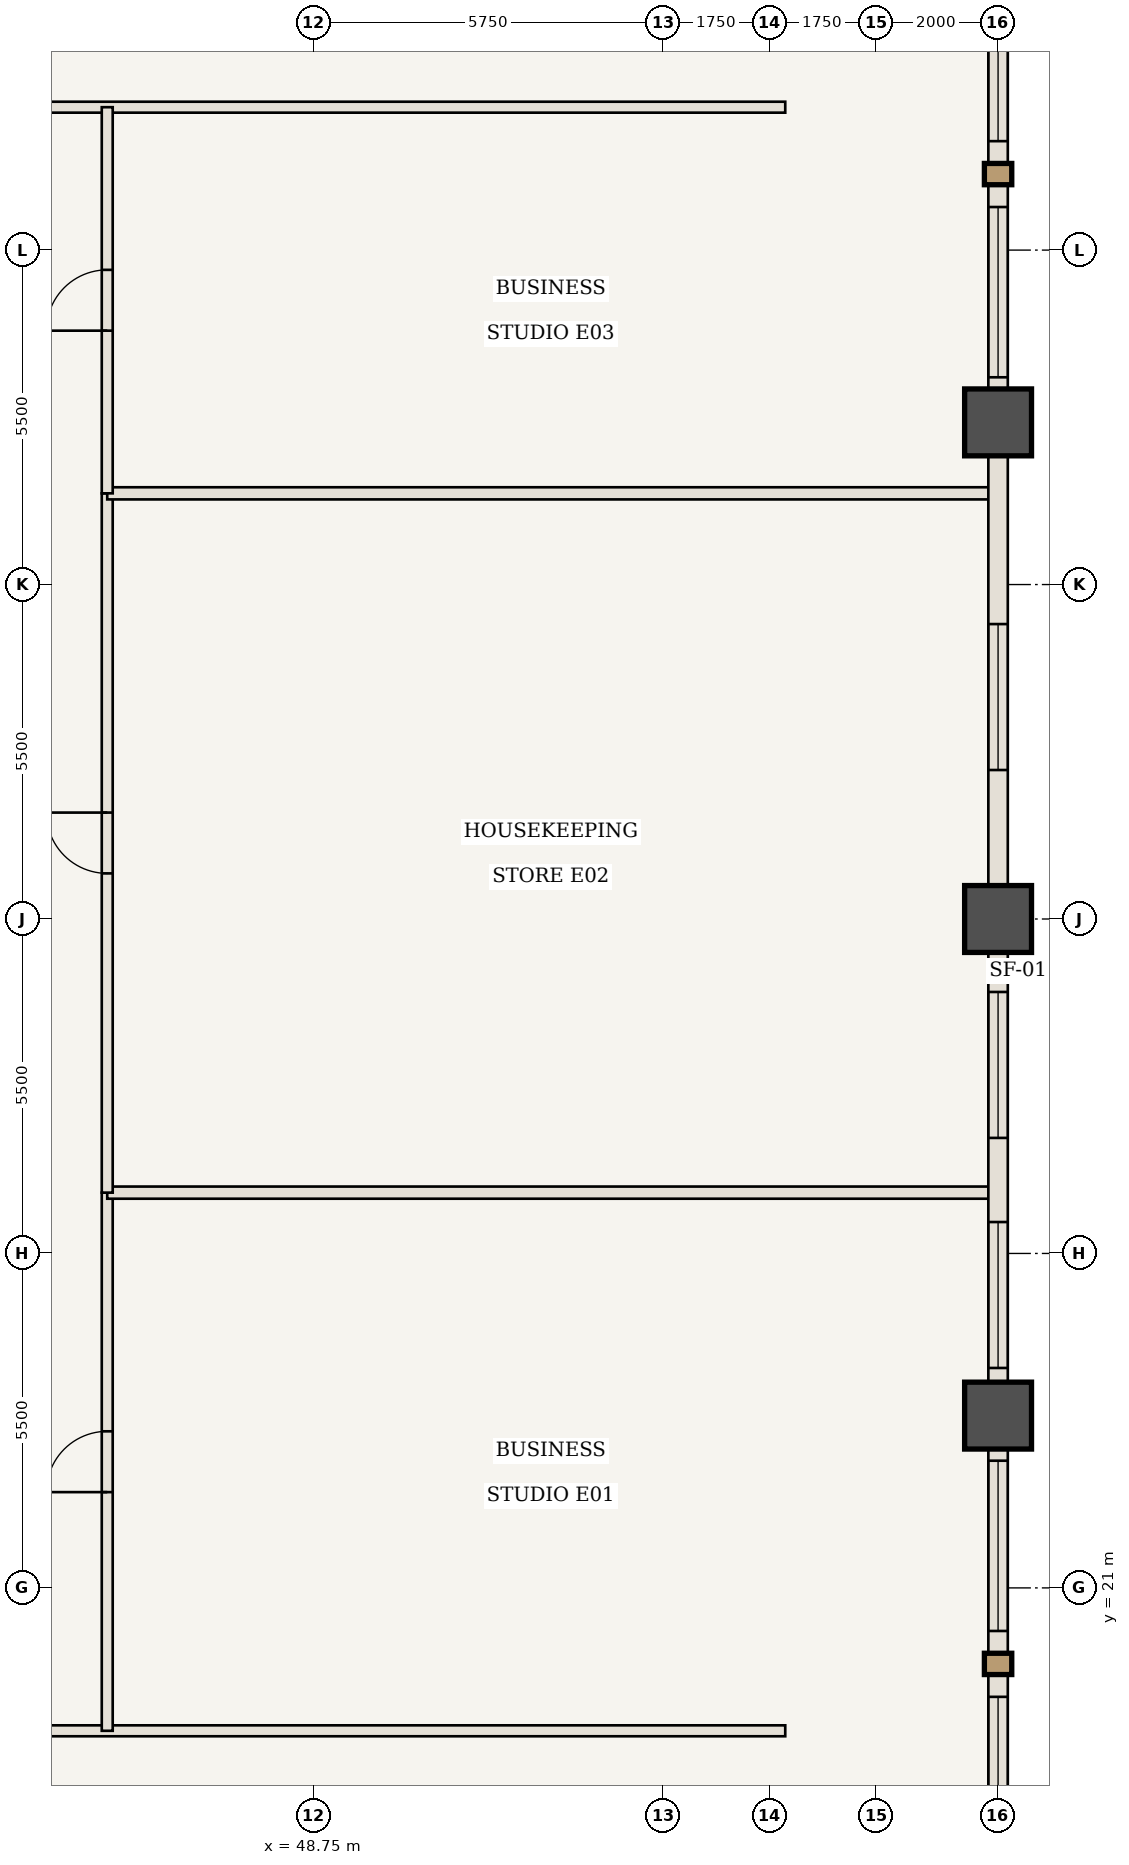
"""IFC4 building model, lengths in metres.
Left out: names, types, materials, properties, quantities, classifications, styles, units other than length and angle.
Written with IfcOpenShell. Run it as: python <this file> out.ifc"""

import sys

from ifc_helpers import new_model, si_unit, direction, frame, frame_2d, origin, origin_2d, place, context, subcontext, project, spatial, rectangle, extrude, element, fill, save


model = new_model("IFC4")
c1 = context("Model", 3, precision=1e-05, world=origin(), true_north=direction((0.0, 1.0)))
c2 = subcontext(c1, "Body", "Model", "MODEL_VIEW")
j1 = project(units=[si_unit("LENGTHUNIT", "METRE"), si_unit("PLANEANGLEUNIT", "RADIAN")], contexts=[c1])
p1 = place(None, origin())
s1 = spatial("IfcSite", under=j1, at=p1, CompositionType="ELEMENT")
p2 = place(p1, origin())
s2 = spatial("IfcBuilding", under=s1, at=p2, CompositionType="ELEMENT")
p3 = place(p2, frame((0.0, 0.0, 63.35)))
s3 = spatial("IfcBuildingStorey", under=s2, at=p3, CompositionType="ELEMENT", Elevation=63.35)
for number, where, z_axis, x_axis in (
    (1, (60.0, 23.833, 0.0), (0.0, 0.0, 1.0), (1.0, 0.0, 0.0)),
    (2, (60.0, 32.0, 0.0), (0.0, 0.0, 1.0), (1.0, 0.0, 0.0)),
    (3, (60.0, 40.167, 0.0), (0.0, 0.0, 1.0), (1.0, 0.0, 0.0)),
):
    element("IfcColumn", number, at=place(p3, frame(where, z_axis=z_axis, x_axis=x_axis)), inside=s3, PredefinedType="COLUMN", context=c2, shape_type="SweptSolid", body=[
        extrude(rectangle(XDim=1.1, YDim=1.1, at=origin_2d()), origin(), (0.0, 0.0, 1.0), 3.5),
    ])
p4 = place(p3, frame((33.4, 18.65, 0.0), z_axis=(0.0, 0.0, 1.0), x_axis=(1.0, 0.0, 0.0)))
e4 = element("IfcWall", 4, at=p4, inside=s3, PredefinedType="STANDARD", context=c2, shape_type="SweptSolid", body=[
    extrude(rectangle(XDim=23.1, YDim=0.18, at=frame_2d((11.55, 0.0))), origin(), (0.0, 0.0, 1.0), 3.32),
])
p5 = place(p4, frame((5.45, 0.0, 0.0)))
e5 = element("IfcOpeningElement", 5, at=p5, cuts=e4, PredefinedType="OPENING", context=c2, shape_type="SweptSolid", body=[
    extrude(rectangle(XDim=1.0, YDim=2.15, at=frame_2d((0.5, 1.075))), frame((0.0, 0.1, 0.0), z_axis=(0.0, -1.0, 0.0), x_axis=(1.0, 0.0, 0.0)), (0.0, 0.0, 1.0), 0.2),
])
p6 = place(p3, frame((39.5, 45.35, 0.0), z_axis=(0.0, 0.0, 1.0), x_axis=(1.0, 0.0, 0.0)))
e6 = element("IfcWall", 6, at=p6, inside=s3, PredefinedType="STANDARD", context=c2, shape_type="SweptSolid", body=[
    extrude(rectangle(XDim=17.0, YDim=0.18, at=frame_2d((8.5, 0.0))), origin(), (0.0, 0.0, 1.0), 3.32),
])
p7 = place(p6, frame((0.95, 0.0, 0.0)))
e7 = element("IfcOpeningElement", 7, at=p7, cuts=e6, PredefinedType="OPENING", context=c2, shape_type="SweptSolid", body=[
    extrude(rectangle(XDim=1.0, YDim=2.15, at=frame_2d((0.5, 1.075))), frame((0.0, 0.1, 0.0), z_axis=(0.0, -1.0, 0.0), x_axis=(1.0, 0.0, 0.0)), (0.0, 0.0, 1.0), 0.2),
])
p8 = place(p3, frame((45.35, 18.65, 0.0), z_axis=(0.0, 0.0, 1.0), x_axis=(0.0, 1.0, 0.0)))
e8 = element("IfcWall", 8, at=p8, inside=s3, PredefinedType="STANDARD", context=c2, shape_type="SweptSolid", body=[
    extrude(rectangle(XDim=8.85, YDim=0.18, at=frame_2d((4.425, 0.0))), origin(), (0.0, 0.0, 1.0), 3.32),
])
p9 = place(p8, frame((3.925, 0.0, 0.0)))
e9 = element("IfcOpeningElement", 9, at=p9, cuts=e8, PredefinedType="OPENING", context=c2, shape_type="SweptSolid", body=[
    extrude(rectangle(XDim=1.0, YDim=2.15, at=frame_2d((0.5, 1.075))), frame((0.0, 0.1, 0.0), z_axis=(0.0, -1.0, 0.0), x_axis=(1.0, 0.0, 0.0)), (0.0, 0.0, 1.0), 0.2),
])
p10 = place(p3, frame((45.35, 27.5, 0.0), z_axis=(0.0, 0.0, 1.0), x_axis=(1.0, 0.0, 0.0)))
e10 = element("IfcWall", 10, at=p10, inside=s3, PredefinedType="STANDARD", context=c2, shape_type="SweptSolid", body=[
    extrude(rectangle(XDim=14.59, YDim=0.2, at=frame_2d((7.295, 0.0))), origin(), (0.0, 0.0, 1.0), 3.32),
])
p11 = place(p3, frame((45.35, 27.5, 0.0), z_axis=(0.0, 0.0, 1.0), x_axis=(0.0, 1.0, 0.0)))
e11 = element("IfcWall", 11, at=p11, inside=s3, PredefinedType="STANDARD", context=c2, shape_type="SweptSolid", body=[
    extrude(rectangle(XDim=11.5, YDim=0.18, at=frame_2d((5.75, 0.0))), origin(), (0.0, 0.0, 1.0), 3.32),
])
p12 = place(p11, frame((5.25, 0.0, 0.0)))
e12 = element("IfcOpeningElement", 12, at=p12, cuts=e11, PredefinedType="OPENING", context=c2, shape_type="SweptSolid", body=[
    extrude(rectangle(XDim=1.0, YDim=2.15, at=frame_2d((0.5, 1.075))), frame((0.0, 0.1, 0.0), z_axis=(0.0, -1.0, 0.0), x_axis=(1.0, 0.0, 0.0)), (0.0, 0.0, 1.0), 0.2),
])
p13 = place(p3, frame((45.35, 39.0, 0.0), z_axis=(0.0, 0.0, 1.0), x_axis=(1.0, 0.0, 0.0)))
e13 = element("IfcWall", 13, at=p13, inside=s3, PredefinedType="STANDARD", context=c2, shape_type="SweptSolid", body=[
    extrude(rectangle(XDim=14.59, YDim=0.2, at=frame_2d((7.295, 0.0))), origin(), (0.0, 0.0, 1.0), 3.32),
])
p14 = place(p3, frame((45.35, 39.0, 0.0), z_axis=(0.0, 0.0, 1.0), x_axis=(0.0, 1.0, 0.0)))
e14 = element("IfcWall", 14, at=p14, inside=s3, PredefinedType="STANDARD", context=c2, shape_type="SweptSolid", body=[
    extrude(rectangle(XDim=6.35, YDim=0.18, at=frame_2d((3.175, 0.0))), origin(), (0.0, 0.0, 1.0), 3.32),
])
p15 = place(p14, frame((2.675, 0.0, 0.0)))
e15 = element("IfcOpeningElement", 15, at=p15, cuts=e14, PredefinedType="OPENING", context=c2, shape_type="SweptSolid", body=[
    extrude(rectangle(XDim=1.0, YDim=2.15, at=frame_2d((0.5, 1.075))), frame((0.0, 0.1, 0.0), z_axis=(0.0, -1.0, 0.0), x_axis=(1.0, 0.0, 0.0)), (0.0, 0.0, 1.0), 0.2),
])
p16 = place(p3, frame((60.0, 23.833, 0.0), z_axis=(0.0, 0.0, 1.0), x_axis=(0.0, -1.0, 0.0)))
e16 = element("IfcWall", 16, at=p16, inside=s3, PredefinedType="USERDEFINED", context=c2, shape_type="SweptSolid", body=[
    extrude(rectangle(XDim=8.167, YDim=0.32, at=frame_2d((4.083, 0.0))), origin(), (0.0, 0.0, 1.0), 2.52),
])
p17 = place(p16, frame((0.742, 0.0, 0.85)))
e17 = element("IfcOpeningElement", 17, at=p17, cuts=e16, PredefinedType="OPENING", context=c2, shape_type="SweptSolid", body=[
    extrude(rectangle(XDim=2.8, YDim=1.47, at=frame_2d((1.4, 0.735))), frame((0.0, 0.17, 0.0), z_axis=(0.0, -1.0, 0.0), x_axis=(1.0, 0.0, 0.0)), (0.0, 0.0, 1.0), 0.34),
])
p18 = place(p16, frame((4.625, 0.0, 0.85)))
e18 = element("IfcOpeningElement", 18, at=p18, cuts=e16, PredefinedType="OPENING", context=c2, shape_type="SweptSolid", body=[
    extrude(rectangle(XDim=2.8, YDim=1.47, at=frame_2d((1.4, 0.735))), frame((0.0, 0.17, 0.0), z_axis=(0.0, -1.0, 0.0), x_axis=(1.0, 0.0, 0.0)), (0.0, 0.0, 1.0), 0.34),
])
p19 = place(p3, frame((60.0, 32.0, 0.0), z_axis=(0.0, 0.0, 1.0), x_axis=(0.0, -1.0, 0.0)))
e19 = element("IfcWall", 19, at=p19, inside=s3, PredefinedType="USERDEFINED", context=c2, shape_type="SweptSolid", body=[
    extrude(rectangle(XDim=8.167, YDim=0.32, at=frame_2d((4.083, 0.0))), origin(), (0.0, 0.0, 1.0), 2.52),
])
p20 = place(p19, frame((1.2, 0.0, 0.85)))
e20 = element("IfcOpeningElement", 20, at=p20, cuts=e19, PredefinedType="OPENING", context=c2, shape_type="SweptSolid", body=[
    extrude(rectangle(XDim=2.4, YDim=1.47, at=frame_2d((1.2, 0.735))), frame((0.0, 0.17, 0.0), z_axis=(0.0, -1.0, 0.0), x_axis=(1.0, 0.0, 0.0)), (0.0, 0.0, 1.0), 0.34),
])
p21 = place(p19, frame((4.983, 0.0, 0.85)))
e21 = element("IfcOpeningElement", 21, at=p21, cuts=e19, PredefinedType="OPENING", context=c2, shape_type="SweptSolid", body=[
    extrude(rectangle(XDim=2.4, YDim=1.47, at=frame_2d((1.2, 0.735))), frame((0.0, 0.17, 0.0), z_axis=(0.0, -1.0, 0.0), x_axis=(1.0, 0.0, 0.0)), (0.0, 0.0, 1.0), 0.34),
])
p22 = place(p3, frame((60.0, 40.167, 0.0), z_axis=(0.0, 0.0, 1.0), x_axis=(0.0, -1.0, 0.0)))
e22 = element("IfcWall", 22, at=p22, inside=s3, PredefinedType="USERDEFINED", context=c2, shape_type="SweptSolid", body=[
    extrude(rectangle(XDim=8.167, YDim=0.32, at=frame_2d((4.083, 0.0))), origin(), (0.0, 0.0, 1.0), 2.52),
])
p23 = place(p22, frame((3.317, 0.0, 0.85)))
e23 = element("IfcOpeningElement", 23, at=p23, cuts=e22, PredefinedType="OPENING", context=c2, shape_type="SweptSolid", body=[
    extrude(rectangle(XDim=2.4, YDim=1.47, at=frame_2d((1.2, 0.735))), frame((0.0, 0.17, 0.0), z_axis=(0.0, -1.0, 0.0), x_axis=(1.0, 0.0, 0.0)), (0.0, 0.0, 1.0), 0.34),
])
p24 = place(p3, frame((60.0, 48.333, 0.0), z_axis=(0.0, 0.0, 1.0), x_axis=(0.0, -1.0, 0.0)))
e24 = element("IfcWall", 24, at=p24, inside=s3, PredefinedType="USERDEFINED", context=c2, shape_type="SweptSolid", body=[
    extrude(rectangle(XDim=8.167, YDim=0.32, at=frame_2d((4.083, 0.0))), origin(), (0.0, 0.0, 1.0), 2.52),
])
p25 = place(p24, frame((0.742, 0.0, 0.85)))
e25 = element("IfcOpeningElement", 25, at=p25, cuts=e24, PredefinedType="OPENING", context=c2, shape_type="SweptSolid", body=[
    extrude(rectangle(XDim=2.8, YDim=1.47, at=frame_2d((1.4, 0.735))), frame((0.0, 0.17, 0.0), z_axis=(0.0, -1.0, 0.0), x_axis=(1.0, 0.0, 0.0)), (0.0, 0.0, 1.0), 0.34),
])
p26 = place(p24, frame((4.625, 0.0, 0.85)))
e26 = element("IfcOpeningElement", 26, at=p26, cuts=e24, PredefinedType="OPENING", context=c2, shape_type="SweptSolid", body=[
    extrude(rectangle(XDim=2.8, YDim=1.47, at=frame_2d((1.4, 0.735))), frame((0.0, 0.17, 0.0), z_axis=(0.0, -1.0, 0.0), x_axis=(1.0, 0.0, 0.0)), (0.0, 0.0, 1.0), 0.34),
])
p27 = place(p9, origin())
e27 = element("IfcDoor", 27, at=p27, inside=s3, OperationType="SINGLE_SWING_LEFT", PredefinedType="DOOR", context=c2, shape_type="SweptSolid", body=[
    extrude(rectangle(XDim=1.0, YDim=2.15, at=frame_2d((0.5, 1.075))), frame((0.0, 0.025, 0.0), z_axis=(0.0, -1.0, 0.0), x_axis=(1.0, 0.0, 0.0)), (0.0, 0.0, 1.0), 0.05),
])
fill(e9, e27)
p28 = place(p12, origin())
e28 = element("IfcDoor", 28, at=p28, inside=s3, OperationType="SINGLE_SWING_RIGHT", PredefinedType="DOOR", context=c2, shape_type="SweptSolid", body=[
    extrude(rectangle(XDim=1.0, YDim=2.15, at=frame_2d((0.5, 1.075))), frame((0.0, 0.025, 0.0), z_axis=(0.0, -1.0, 0.0), x_axis=(1.0, 0.0, 0.0)), (0.0, 0.0, 1.0), 0.05),
])
fill(e12, e28)
p29 = place(p15, origin())
e29 = element("IfcDoor", 29, at=p29, inside=s3, OperationType="SINGLE_SWING_LEFT", PredefinedType="DOOR", context=c2, shape_type="SweptSolid", body=[
    extrude(rectangle(XDim=1.0, YDim=2.15, at=frame_2d((0.5, 1.075))), frame((0.0, 0.025, 0.0), z_axis=(0.0, -1.0, 0.0), x_axis=(1.0, 0.0, 0.0)), (0.0, 0.0, 1.0), 0.05),
])
fill(e15, e29)
p30 = place(p17, origin())
e30 = element("IfcWindow", 30, at=p30, inside=s3, PartitioningType="SINGLE_PANEL", PredefinedType="WINDOW", context=c2, shape_type="SweptSolid", body=[
    extrude(rectangle(XDim=2.8, YDim=1.47, at=frame_2d((1.4, 0.735))), frame((0.0, 0.03, 0.0), z_axis=(0.0, -1.0, 0.0), x_axis=(1.0, 0.0, 0.0)), (0.0, 0.0, 1.0), 0.06),
])
fill(e17, e30)
p31 = place(p18, origin())
e31 = element("IfcWindow", 31, at=p31, inside=s3, PartitioningType="SINGLE_PANEL", PredefinedType="WINDOW", context=c2, shape_type="SweptSolid", body=[
    extrude(rectangle(XDim=2.8, YDim=1.47, at=frame_2d((1.4, 0.735))), frame((0.0, 0.03, 0.0), z_axis=(0.0, -1.0, 0.0), x_axis=(1.0, 0.0, 0.0)), (0.0, 0.0, 1.0), 0.06),
])
fill(e18, e31)
p32 = place(p20, origin())
e32 = element("IfcWindow", 32, at=p32, inside=s3, PartitioningType="SINGLE_PANEL", PredefinedType="WINDOW", context=c2, shape_type="SweptSolid", body=[
    extrude(rectangle(XDim=2.4, YDim=1.47, at=frame_2d((1.2, 0.735))), frame((0.0, 0.03, 0.0), z_axis=(0.0, -1.0, 0.0), x_axis=(1.0, 0.0, 0.0)), (0.0, 0.0, 1.0), 0.06),
])
fill(e20, e32)
p33 = place(p21, origin())
e33 = element("IfcWindow", 33, at=p33, inside=s3, PartitioningType="SINGLE_PANEL", PredefinedType="WINDOW", context=c2, shape_type="SweptSolid", body=[
    extrude(rectangle(XDim=2.4, YDim=1.47, at=frame_2d((1.2, 0.735))), frame((0.0, 0.03, 0.0), z_axis=(0.0, -1.0, 0.0), x_axis=(1.0, 0.0, 0.0)), (0.0, 0.0, 1.0), 0.06),
])
fill(e21, e33)
p34 = place(p23, origin())
e34 = element("IfcWindow", 34, at=p34, inside=s3, PartitioningType="SINGLE_PANEL", PredefinedType="WINDOW", context=c2, shape_type="SweptSolid", body=[
    extrude(rectangle(XDim=2.4, YDim=1.47, at=frame_2d((1.2, 0.735))), frame((0.0, 0.03, 0.0), z_axis=(0.0, -1.0, 0.0), x_axis=(1.0, 0.0, 0.0)), (0.0, 0.0, 1.0), 0.06),
])
fill(e23, e34)
p35 = place(p25, origin())
e35 = element("IfcWindow", 35, at=p35, inside=s3, PartitioningType="SINGLE_PANEL", PredefinedType="WINDOW", context=c2, shape_type="SweptSolid", body=[
    extrude(rectangle(XDim=2.8, YDim=1.47, at=frame_2d((1.4, 0.735))), frame((0.0, 0.03, 0.0), z_axis=(0.0, -1.0, 0.0), x_axis=(1.0, 0.0, 0.0)), (0.0, 0.0, 1.0), 0.06),
])
fill(e25, e35)
p36 = place(p26, origin())
e36 = element("IfcWindow", 36, at=p36, inside=s3, PartitioningType="SINGLE_PANEL", PredefinedType="WINDOW", context=c2, shape_type="SweptSolid", body=[
    extrude(rectangle(XDim=2.8, YDim=1.47, at=frame_2d((1.4, 0.735))), frame((0.0, 0.03, 0.0), z_axis=(0.0, -1.0, 0.0), x_axis=(1.0, 0.0, 0.0)), (0.0, 0.0, 1.0), 0.06),
])
fill(e26, e36)
save(model, sys.argv[1])
